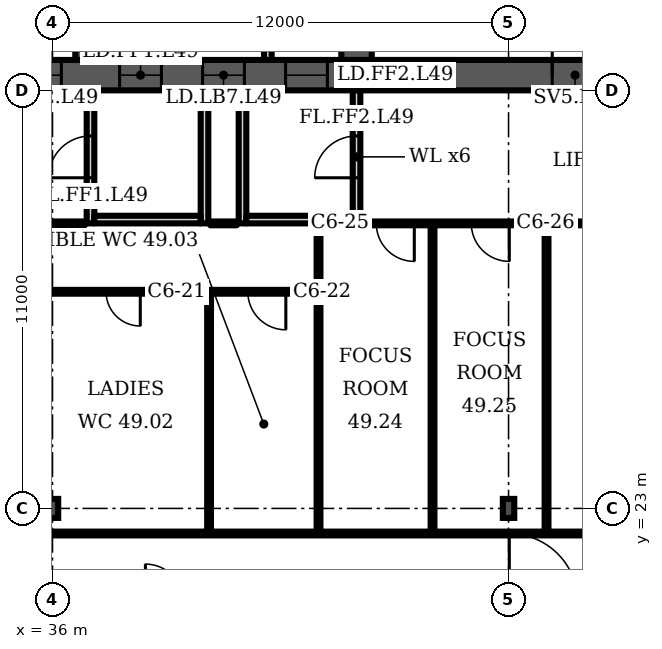
"""IFC4 building model, lengths in metres.
Left out: names, types, materials, properties, quantities, classifications, styles, units other than length and angle.
Written with IfcOpenShell. Run it as: python <this file> out.ifc"""

import sys

from ifc_helpers import new_model, si_unit, direction, frame, frame_2d, origin, origin_2d, place, context, subcontext, project, spatial, polyline, rectangle, i_section, outline, extrude, element, fill, save


model = new_model("IFC4")
c1 = context("Model", 3, precision=1e-05, world=origin(), true_north=direction((0.0, 1.0)))
c2 = subcontext(c1, "Body", "Model", "MODEL_VIEW")
j1 = project(units=[si_unit("LENGTHUNIT", "METRE"), si_unit("PLANEANGLEUNIT", "RADIAN")], contexts=[c1])
p1 = place(None, origin())
s1 = spatial("IfcSite", under=j1, at=p1, CompositionType="ELEMENT")
p2 = place(p1, origin())
s2 = spatial("IfcBuilding", under=s1, at=p2, CompositionType="ELEMENT")
p3 = place(p2, frame((0.0, 0.0, 198.7)))
s3 = spatial("IfcBuildingStorey", under=s2, at=p3, CompositionType="ELEMENT", Elevation=198.7)
p4 = place(p3, frame((16.0, 34.4, 0.0), z_axis=(0.0, 0.0, 1.0), x_axis=(1.0, 0.0, 0.0)))
e1 = element("IfcWall", 1, at=p4, inside=s3, PredefinedType="SHEAR", context=c2, shape_type="SweptSolid", body=[
    extrude(rectangle(XDim=42.0, YDim=0.8, at=frame_2d((21.0, 0.0))), origin(), (0.0, 0.0, 1.0), 3.6),
])
p5 = place(p4, frame((1.75, 0.0, 0.0)))
e2 = element("IfcOpeningElement", 2, at=p5, cuts=e1, PredefinedType="OPENING", context=c2, shape_type="SweptSolid", body=[
    extrude(rectangle(XDim=1.0, YDim=2.1, at=frame_2d((0.5, 1.05))), frame((0.0, 0.41, 0.0), z_axis=(0.0, -1.0, 0.0), x_axis=(1.0, 0.0, 0.0)), (0.0, 0.0, 1.0), 0.82),
])
p6 = place(p4, frame((4.65, 0.0, 0.0)))
e3 = element("IfcOpeningElement", 3, at=p6, cuts=e1, PredefinedType="OPENING", context=c2, shape_type="SweptSolid", body=[
    extrude(rectangle(XDim=1.0, YDim=2.1, at=frame_2d((0.5, 1.05))), frame((0.0, 0.41, 0.0), z_axis=(0.0, -1.0, 0.0), x_axis=(1.0, 0.0, 0.0)), (0.0, 0.0, 1.0), 0.82),
])
p7 = place(p4, frame((7.65, 0.0, 0.0)))
e4 = element("IfcOpeningElement", 4, at=p7, cuts=e1, PredefinedType="OPENING", context=c2, shape_type="SweptSolid", body=[
    extrude(rectangle(XDim=1.2, YDim=2.1, at=frame_2d((0.6, 1.05))), frame((0.0, 0.41, 0.0), z_axis=(0.0, -1.0, 0.0), x_axis=(1.0, 0.0, 0.0)), (0.0, 0.0, 1.0), 0.82),
])
p8 = place(p4, frame((14.767, 0.0, 0.0)))
e5 = element("IfcOpeningElement", 5, at=p8, cuts=e1, PredefinedType="OPENING", context=c2, shape_type="SweptSolid", body=[
    extrude(rectangle(XDim=1.1, YDim=2.1, at=frame_2d((0.55, 1.05))), frame((0.0, 0.41, 0.0), z_axis=(0.0, -1.0, 0.0), x_axis=(1.0, 0.0, 0.0)), (0.0, 0.0, 1.0), 0.82),
])
p9 = place(p4, frame((19.133, 0.0, 0.0)))
e6 = element("IfcOpeningElement", 6, at=p9, cuts=e1, PredefinedType="OPENING", context=c2, shape_type="SweptSolid", body=[
    extrude(rectangle(XDim=1.1, YDim=2.1, at=frame_2d((0.55, 1.05))), frame((0.0, 0.41, 0.0), z_axis=(0.0, -1.0, 0.0), x_axis=(1.0, 0.0, 0.0)), (0.0, 0.0, 1.0), 0.82),
])
p10 = place(p4, frame((16.8, 0.0, 0.0)))
e7 = element("IfcOpeningElement", 7, at=p10, cuts=e1, PredefinedType="OPENING", context=c2, shape_type="SweptSolid", body=[
    extrude(rectangle(XDim=1.4, YDim=2.1, at=frame_2d((0.7, 1.05))), frame((0.0, 0.41, 0.0), z_axis=(0.0, -1.0, 0.0), x_axis=(1.0, 0.0, 0.0)), (0.0, 0.0, 1.0), 0.82),
])
p11 = place(p4, frame((21.767, 0.0, 0.0)))
e8 = element("IfcOpeningElement", 8, at=p11, cuts=e1, PredefinedType="OPENING", context=c2, shape_type="SweptSolid", body=[
    extrude(rectangle(XDim=1.1, YDim=2.1, at=frame_2d((0.55, 1.05))), frame((0.0, 0.41, 0.0), z_axis=(0.0, -1.0, 0.0), x_axis=(1.0, 0.0, 0.0)), (0.0, 0.0, 1.0), 0.82),
])
p12 = place(p4, frame((23.95, 0.0, 0.0)))
e9 = element("IfcOpeningElement", 9, at=p12, cuts=e1, PredefinedType="OPENING", context=c2, shape_type="SweptSolid", body=[
    extrude(rectangle(XDim=1.1, YDim=2.1, at=frame_2d((0.55, 1.05))), frame((0.0, 0.41, 0.0), z_axis=(0.0, -1.0, 0.0), x_axis=(1.0, 0.0, 0.0)), (0.0, 0.0, 1.0), 0.82),
])
p13 = place(p4, frame((26.133, 0.0, 0.0)))
e10 = element("IfcOpeningElement", 10, at=p13, cuts=e1, PredefinedType="OPENING", context=c2, shape_type="SweptSolid", body=[
    extrude(rectangle(XDim=1.1, YDim=2.1, at=frame_2d((0.55, 1.05))), frame((0.0, 0.41, 0.0), z_axis=(0.0, -1.0, 0.0), x_axis=(1.0, 0.0, 0.0)), (0.0, 0.0, 1.0), 0.82),
])
p14 = place(p4, frame((33.15, 0.0, 0.0)))
e11 = element("IfcOpeningElement", 11, at=p14, cuts=e1, PredefinedType="OPENING", context=c2, shape_type="SweptSolid", body=[
    extrude(rectangle(XDim=1.2, YDim=2.1, at=frame_2d((0.6, 1.05))), frame((0.0, 0.41, 0.0), z_axis=(0.0, -1.0, 0.0), x_axis=(1.0, 0.0, 0.0)), (0.0, 0.0, 1.0), 0.82),
])
p15 = place(p4, frame((35.817, 0.0, 0.0)))
e12 = element("IfcOpeningElement", 12, at=p15, cuts=e1, PredefinedType="OPENING", context=c2, shape_type="SweptSolid", body=[
    extrude(rectangle(XDim=1.0, YDim=2.1, at=frame_2d((0.5, 1.05))), frame((0.0, 0.41, 0.0), z_axis=(0.0, -1.0, 0.0), x_axis=(1.0, 0.0, 0.0)), (0.0, 0.0, 1.0), 0.82),
])
p16 = place(p4, frame((39.95, 0.0, 0.0)))
e13 = element("IfcOpeningElement", 13, at=p16, cuts=e1, PredefinedType="OPENING", context=c2, shape_type="SweptSolid", body=[
    extrude(rectangle(XDim=1.0, YDim=2.1, at=frame_2d((0.5, 1.05))), frame((0.0, 0.41, 0.0), z_axis=(0.0, -1.0, 0.0), x_axis=(1.0, 0.0, 0.0)), (0.0, 0.0, 1.0), 0.82),
])
p17 = place(p4, frame((37.767, 0.0, 0.0)))
e14 = element("IfcOpeningElement", 14, at=p17, cuts=e1, PredefinedType="OPENING", context=c2, shape_type="SweptSolid", body=[
    extrude(rectangle(XDim=1.4, YDim=2.1, at=frame_2d((0.7, 1.05))), frame((0.0, 0.41, 0.0), z_axis=(0.0, -1.0, 0.0), x_axis=(1.0, 0.0, 0.0)), (0.0, 0.0, 1.0), 0.82),
])
p18 = place(p3, frame((37.0, 34.8, 0.0), z_axis=(0.0, 0.0, 1.0), x_axis=(0.0, 1.0, 0.0)))
e15 = element("IfcWall", 15, at=p18, inside=s3, PredefinedType="SHEAR", context=c2, shape_type="SweptSolid", body=[
    extrude(rectangle(XDim=14.987, YDim=0.8, at=frame_2d((7.493, 0.0))), origin(), (0.0, 0.0, 1.0), 3.6),
])
p19 = place(p18, frame((11.312, 0.0, 0.0)))
e16 = element("IfcOpeningElement", 16, at=p19, cuts=e15, PredefinedType="OPENING", context=c2, shape_type="SweptSolid", body=[
    extrude(rectangle(XDim=1.0, YDim=2.1, at=frame_2d((0.5, 1.05))), frame((0.0, 0.41, 0.0), z_axis=(0.0, -1.0, 0.0), x_axis=(1.0, 0.0, 0.0)), (0.0, 0.0, 1.0), 0.82),
])
p20 = place(p18, frame((3.6, 0.0, 0.0)))
e17 = element("IfcOpeningElement", 17, at=p20, cuts=e15, PredefinedType="OPENING", context=c2, shape_type="SweptSolid", body=[
    extrude(rectangle(XDim=1.1, YDim=2.1, at=frame_2d((0.55, 1.05))), frame((0.0, 0.41, 0.0), z_axis=(0.0, -1.0, 0.0), x_axis=(1.0, 0.0, 0.0)), (0.0, 0.0, 1.0), 0.82),
])
p21 = place(p3, frame((44.0, 34.8, 0.0), z_axis=(0.0, 0.0, 1.0), x_axis=(0.0, 1.0, 0.0)))
e18 = element("IfcWall", 18, at=p21, inside=s3, PredefinedType="SHEAR", context=c2, shape_type="SweptSolid", body=[
    extrude(rectangle(XDim=14.374, YDim=0.8, at=frame_2d((7.187, 0.0))), origin(), (0.0, 0.0, 1.0), 3.6),
])
p22 = place(p21, frame((11.312, 0.0, 0.0)))
e19 = element("IfcOpeningElement", 19, at=p22, cuts=e18, PredefinedType="OPENING", context=c2, shape_type="SweptSolid", body=[
    extrude(rectangle(XDim=1.0, YDim=2.1, at=frame_2d((0.5, 1.05))), frame((0.0, 0.41, 0.0), z_axis=(0.0, -1.0, 0.0), x_axis=(1.0, 0.0, 0.0)), (0.0, 0.0, 1.0), 0.82),
])
p23 = place(p21, frame((3.6, 0.0, 0.0)))
e20 = element("IfcOpeningElement", 20, at=p23, cuts=e18, PredefinedType="OPENING", context=c2, shape_type="SweptSolid", body=[
    extrude(rectangle(XDim=1.1, YDim=2.1, at=frame_2d((0.55, 1.05))), frame((0.0, 0.41, 0.0), z_axis=(0.0, -1.0, 0.0), x_axis=(1.0, 0.0, 0.0)), (0.0, 0.0, 1.0), 0.82),
])
for number, where, z_axis, x_axis in (
    (21, (36.0, 23.0, 0.0), (0.0, 0.0, 1.0), (1.0, 0.0, 0.0)),
    (22, (48.0, 23.0, 0.0), (0.0, 0.0, 1.0), (1.0, 0.0, 0.0)),
):
    element("IfcColumn", number, at=place(p3, frame(where, z_axis=z_axis, x_axis=x_axis)), inside=s3, PredefinedType="COLUMN", context=c2, shape_type="SweptSolid", body=[
        extrude(i_section(OverallWidth=0.3, OverallDepth=0.5, WebThickness=0.014, FlangeThickness=0.028, FilletRadius=0.027, at=origin_2d()), origin(), (0.0, 0.0, 1.0), 3.6),
    ])
p24 = place(p3, origin())
e23 = element("IfcWall", 23, at=p24, inside=s3, PredefinedType="PARTITIONING", context=c2, shape_type="SweptSolid", body=[
    extrude(outline(polyline([(34.567, 37.85), (34.767, 37.85), (36.6, 37.85), (36.6, 37.65), (34.767, 37.65), (34.767, 34.8), (34.567, 34.8), (34.567, 37.85)])), origin(), (0.0, 0.0, 1.0), 3.15),
])
p25 = place(p3, origin())
e24 = element("IfcWall", 24, at=p25, inside=s3, PredefinedType="PARTITIONING", context=c2, shape_type="SweptSolid", body=[
    extrude(outline(polyline([(41.567, 37.1), (39.433, 37.1), (39.433, 34.8), (39.233, 34.8), (39.233, 37.65), (37.4, 37.65), (37.4, 37.85), (39.233, 37.85), (39.433, 37.85), (39.433, 37.3), (41.567, 37.3), (41.567, 37.55), (41.767, 37.55), (43.6, 37.55), (43.6, 37.35), (41.767, 37.35), (41.767, 34.8), (41.567, 34.8), (41.567, 37.1)])), origin(), (0.0, 0.0, 1.0), 3.15),
])
p26 = place(p3, frame((37.0, 30.5, 0.0), z_axis=(0.0, 0.0, 1.0), x_axis=(0.0, 1.0, 0.0)))
e25 = element("IfcWall", 25, at=p26, inside=s3, PredefinedType="PARTITIONING", context=c2, shape_type="SweptSolid", body=[
    extrude(rectangle(XDim=3.5, YDim=0.2, at=frame_2d((1.75, 0.0))), origin(), (0.0, 0.0, 1.0), 3.15),
])
p27 = place(p26, frame((1.2, 0.0, 0.0)))
e26 = element("IfcOpeningElement", 26, at=p27, cuts=e25, PredefinedType="OPENING", context=c2, shape_type="SweptSolid", body=[
    extrude(rectangle(XDim=1.1, YDim=2.1, at=frame_2d((0.55, 1.05))), frame((0.0, 0.11, 0.0), z_axis=(0.0, -1.0, 0.0), x_axis=(1.0, 0.0, 0.0)), (0.0, 0.0, 1.0), 0.22),
])
p28 = place(p3, frame((40.0, 30.5, 0.0), z_axis=(0.0, 0.0, 1.0), x_axis=(0.0, 1.0, 0.0)))
e27 = element("IfcWall", 27, at=p28, inside=s3, PredefinedType="PARTITIONING", context=c2, shape_type="SweptSolid", body=[
    extrude(rectangle(XDim=3.5, YDim=0.2, at=frame_2d((1.75, 0.0))), origin(), (0.0, 0.0, 1.0), 3.15),
])
p29 = place(p3, frame((37.1, 30.6, 0.0), z_axis=(0.0, 0.0, 1.0), x_axis=(1.0, 0.0, 0.0)))
e28 = element("IfcWall", 28, at=p29, inside=s3, PredefinedType="PARTITIONING", context=c2, shape_type="SweptSolid", body=[
    extrude(rectangle(XDim=2.8, YDim=0.2, at=frame_2d((1.4, 0.0))), origin(), (0.0, 0.0, 1.0), 3.15),
])
p30 = place(p3, frame((41.0, 30.5, 0.0), z_axis=(0.0, 0.0, 1.0), x_axis=(0.0, 1.0, 0.0)))
e29 = element("IfcWall", 29, at=p30, inside=s3, PredefinedType="PARTITIONING", context=c2, shape_type="SweptSolid", body=[
    extrude(rectangle(XDim=3.5, YDim=0.2, at=frame_2d((1.75, 0.0))), origin(), (0.0, 0.0, 1.0), 3.15),
])
p31 = place(p3, frame((44.0, 30.5, 0.0), z_axis=(0.0, 0.0, 1.0), x_axis=(0.0, 1.0, 0.0)))
e30 = element("IfcWall", 30, at=p31, inside=s3, PredefinedType="PARTITIONING", context=c2, shape_type="SweptSolid", body=[
    extrude(rectangle(XDim=3.5, YDim=0.2, at=frame_2d((1.75, 0.0))), origin(), (0.0, 0.0, 1.0), 3.15),
])
p32 = place(p31, frame((1.2, 0.0, 0.0)))
e31 = element("IfcOpeningElement", 31, at=p32, cuts=e30, PredefinedType="OPENING", context=c2, shape_type="SweptSolid", body=[
    extrude(rectangle(XDim=1.1, YDim=2.1, at=frame_2d((0.55, 1.05))), frame((0.0, 0.11, 0.0), z_axis=(0.0, -1.0, 0.0), x_axis=(1.0, 0.0, 0.0)), (0.0, 0.0, 1.0), 0.22),
])
p33 = place(p3, frame((41.1, 30.6, 0.0), z_axis=(0.0, 0.0, 1.0), x_axis=(1.0, 0.0, 0.0)))
e32 = element("IfcWall", 32, at=p33, inside=s3, PredefinedType="PARTITIONING", context=c2, shape_type="SweptSolid", body=[
    extrude(rectangle(XDim=2.8, YDim=0.2, at=frame_2d((1.4, 0.0))), origin(), (0.0, 0.0, 1.0), 3.15),
])
p34 = place(p3, frame((18.2, 30.5, 0.0), z_axis=(0.0, 0.0, 1.0), x_axis=(1.0, 0.0, 0.0)))
e33 = element("IfcWall", 33, at=p34, inside=s3, PredefinedType="PARTITIONING", context=c2, shape_type="SweptSolid", body=[
    extrude(rectangle(XDim=18.65, YDim=0.1, at=frame_2d((9.325, 0.0))), origin(), (0.0, 0.0, 1.0), 3.15),
])
p35 = place(p34, frame((0.74, 0.0, 0.0)))
e34 = element("IfcOpeningElement", 34, at=p35, cuts=e33, PredefinedType="OPENING", context=c2, shape_type="SweptSolid", body=[
    extrude(rectangle(XDim=1.0, YDim=2.1, at=frame_2d((0.5, 1.05))), frame((0.0, 0.06, 0.0), z_axis=(0.0, -1.0, 0.0), x_axis=(1.0, 0.0, 0.0)), (0.0, 0.0, 1.0), 0.12),
])
p36 = place(p3, frame((18.955, 22.34, 0.0), z_axis=(0.0, 0.0, 1.0), x_axis=(1.0, 0.0, 0.0)))
e35 = element("IfcWall", 35, at=p36, inside=s3, PredefinedType="PARTITIONING", context=c2, shape_type="SweptSolid", body=[
    extrude(rectangle(XDim=42.555, YDim=0.1, at=frame_2d((21.277, 0.0))), origin(), (0.0, 0.0, 1.0), 3.15),
])
p37 = place(p36, frame((0.62, 0.0, 0.0)))
e36 = element("IfcOpeningElement", 36, at=p37, cuts=e35, PredefinedType="OPENING", context=c2, shape_type="SweptSolid", body=[
    extrude(rectangle(XDim=1.0, YDim=2.1, at=frame_2d((0.5, 1.05))), frame((0.0, 0.06, 0.0), z_axis=(0.0, -1.0, 0.0), x_axis=(1.0, 0.0, 0.0)), (0.0, 0.0, 1.0), 0.12),
])
p38 = place(p36, frame((8.62, 0.0, 0.0)))
e37 = element("IfcOpeningElement", 37, at=p38, cuts=e35, PredefinedType="OPENING", context=c2, shape_type="SweptSolid", body=[
    extrude(rectangle(XDim=1.0, YDim=2.1, at=frame_2d((0.5, 1.05))), frame((0.0, 0.06, 0.0), z_axis=(0.0, -1.0, 0.0), x_axis=(1.0, 0.0, 0.0)), (0.0, 0.0, 1.0), 0.12),
])
p39 = place(p3, frame((31.0, 28.7, 0.0), z_axis=(0.0, 0.0, 1.0), x_axis=(1.0, 0.0, 0.0)))
e38 = element("IfcWall", 38, at=p39, inside=s3, PredefinedType="PARTITIONING", context=c2, shape_type="SweptSolid", body=[
    extrude(rectangle(XDim=12.0, YDim=0.1, at=frame_2d((6.0, 0.0))), origin(), (0.0, 0.0, 1.0), 3.15),
])
p40 = place(p39, frame((1.87, 0.0, 0.0)))
e39 = element("IfcOpeningElement", 39, at=p40, cuts=e38, PredefinedType="OPENING", context=c2, shape_type="SweptSolid", body=[
    extrude(rectangle(XDim=0.9, YDim=2.1, at=frame_2d((0.45, 1.05))), frame((0.0, 0.06, 0.0), z_axis=(0.0, -1.0, 0.0), x_axis=(1.0, 0.0, 0.0)), (0.0, 0.0, 1.0), 0.12),
])
p41 = place(p39, frame((6.41, 0.0, 0.0)))
e40 = element("IfcOpeningElement", 40, at=p41, cuts=e38, PredefinedType="OPENING", context=c2, shape_type="SweptSolid", body=[
    extrude(rectangle(XDim=0.9, YDim=2.1, at=frame_2d((0.45, 1.05))), frame((0.0, 0.06, 0.0), z_axis=(0.0, -1.0, 0.0), x_axis=(1.0, 0.0, 0.0)), (0.0, 0.0, 1.0), 0.12),
])
p42 = place(p39, frame((10.14, 0.0, 0.0)))
e41 = element("IfcOpeningElement", 41, at=p42, cuts=e38, PredefinedType="OPENING", context=c2, shape_type="SweptSolid", body=[
    extrude(rectangle(XDim=1.0, YDim=2.1, at=frame_2d((0.5, 1.05))), frame((0.0, 0.06, 0.0), z_axis=(0.0, -1.0, 0.0), x_axis=(1.0, 0.0, 0.0)), (0.0, 0.0, 1.0), 0.12),
])
p43 = place(p3, frame((40.12, 22.34, 0.0), z_axis=(0.0, 0.0, 1.0), x_axis=(0.0, 1.0, 0.0)))
e42 = element("IfcWall", 42, at=p43, inside=s3, PredefinedType="PARTITIONING", context=c2, shape_type="SweptSolid", body=[
    extrude(rectangle(XDim=6.36, YDim=0.1, at=frame_2d((3.18, 0.0))), origin(), (0.0, 0.0, 1.0), 3.15),
])
p44 = place(p3, frame((43.0, 22.34, 0.0), z_axis=(0.0, 0.0, 1.0), x_axis=(0.0, 1.0, 0.0)))
e43 = element("IfcWall", 43, at=p44, inside=s3, PredefinedType="PARTITIONING", context=c2, shape_type="SweptSolid", body=[
    extrude(rectangle(XDim=8.15, YDim=0.1, at=frame_2d((4.075, 0.0))), origin(), (0.0, 0.0, 1.0), 3.15),
])
for number, where, z_axis, x_axis in (
    (44, (46.0, 22.34, 0.0), (0.0, 0.0, 1.0), (0.0, 1.0, 0.0)),
    (45, (49.0, 22.34, 0.0), (0.0, 0.0, 1.0), (0.0, 1.0, 0.0)),
):
    element("IfcWall", number, at=place(p3, frame(where, z_axis=z_axis, x_axis=x_axis)), inside=s3, PredefinedType="PARTITIONING", context=c2, shape_type="SweptSolid", body=[
        extrude(rectangle(XDim=8.16, YDim=0.1, at=frame_2d((4.08, 0.0))), origin(), (0.0, 0.0, 1.0), 3.15),
    ])
p45 = place(p3, frame((40.15, 30.5, 0.0), z_axis=(0.0, 0.0, 1.0), x_axis=(1.0, 0.0, 0.0)))
e46 = element("IfcWall", 46, at=p45, inside=s3, PredefinedType="PARTITIONING", context=c2, shape_type="SweptSolid", body=[
    extrude(rectangle(XDim=0.7, YDim=0.1, at=frame_2d((0.35, 0.0))), origin(), (0.0, 0.0, 1.0), 3.15),
])
p46 = place(p3, frame((44.15, 30.5, 0.0), z_axis=(0.0, 0.0, 1.0), x_axis=(1.0, 0.0, 0.0)))
e47 = element("IfcWall", 47, at=p46, inside=s3, PredefinedType="PARTITIONING", context=c2, shape_type="SweptSolid", body=[
    extrude(rectangle(XDim=13.85, YDim=0.1, at=frame_2d((6.925, 0.0))), origin(), (0.0, 0.0, 1.0), 3.15),
])
p47 = place(p46, frame((0.37, 0.0, 0.0)))
e48 = element("IfcOpeningElement", 48, at=p47, cuts=e47, PredefinedType="OPENING", context=c2, shape_type="SweptSolid", body=[
    extrude(rectangle(XDim=1.0, YDim=2.1, at=frame_2d((0.5, 1.05))), frame((0.0, 0.06, 0.0), z_axis=(0.0, -1.0, 0.0), x_axis=(1.0, 0.0, 0.0)), (0.0, 0.0, 1.0), 0.12),
])
p48 = place(p46, frame((2.87, 0.0, 0.0)))
e49 = element("IfcOpeningElement", 49, at=p48, cuts=e47, PredefinedType="OPENING", context=c2, shape_type="SweptSolid", body=[
    extrude(rectangle(XDim=1.0, YDim=2.1, at=frame_2d((0.5, 1.05))), frame((0.0, 0.06, 0.0), z_axis=(0.0, -1.0, 0.0), x_axis=(1.0, 0.0, 0.0)), (0.0, 0.0, 1.0), 0.12),
])
p49 = place(p46, frame((10.67, 0.0, 0.0)))
e50 = element("IfcOpeningElement", 50, at=p49, cuts=e47, PredefinedType="OPENING", context=c2, shape_type="SweptSolid", body=[
    extrude(rectangle(XDim=1.0, YDim=2.1, at=frame_2d((0.5, 1.05))), frame((0.0, 0.06, 0.0), z_axis=(0.0, -1.0, 0.0), x_axis=(1.0, 0.0, 0.0)), (0.0, 0.0, 1.0), 0.12),
])
p50 = place(p9, origin())
e51 = element("IfcDoor", 51, at=p50, inside=s3, OperationType="DOUBLE_DOOR_SLIDING", PredefinedType="DOOR", context=c2, shape_type="SweptSolid", body=[
    extrude(rectangle(XDim=1.1, YDim=2.1, at=frame_2d((0.55, 1.05))), frame((0.0, 0.025, 0.0), z_axis=(0.0, -1.0, 0.0), x_axis=(1.0, 0.0, 0.0)), (0.0, 0.0, 1.0), 0.05),
])
fill(e6, e51)
p51 = place(p11, origin())
e52 = element("IfcDoor", 52, at=p51, inside=s3, OperationType="DOUBLE_DOOR_SLIDING", PredefinedType="DOOR", context=c2, shape_type="SweptSolid", body=[
    extrude(rectangle(XDim=1.1, YDim=2.1, at=frame_2d((0.55, 1.05))), frame((0.0, 0.025, 0.0), z_axis=(0.0, -1.0, 0.0), x_axis=(1.0, 0.0, 0.0)), (0.0, 0.0, 1.0), 0.05),
])
fill(e8, e52)
p52 = place(p12, origin())
e53 = element("IfcDoor", 53, at=p52, inside=s3, OperationType="DOUBLE_DOOR_SLIDING", PredefinedType="DOOR", context=c2, shape_type="SweptSolid", body=[
    extrude(rectangle(XDim=1.1, YDim=2.1, at=frame_2d((0.55, 1.05))), frame((0.0, 0.025, 0.0), z_axis=(0.0, -1.0, 0.0), x_axis=(1.0, 0.0, 0.0)), (0.0, 0.0, 1.0), 0.05),
])
fill(e9, e53)
p53 = place(p13, origin())
e54 = element("IfcDoor", 54, at=p53, inside=s3, OperationType="DOUBLE_DOOR_SLIDING", PredefinedType="DOOR", context=c2, shape_type="SweptSolid", body=[
    extrude(rectangle(XDim=1.1, YDim=2.1, at=frame_2d((0.55, 1.05))), frame((0.0, 0.025, 0.0), z_axis=(0.0, -1.0, 0.0), x_axis=(1.0, 0.0, 0.0)), (0.0, 0.0, 1.0), 0.05),
])
fill(e10, e54)
p54 = place(p14, origin())
e55 = element("IfcDoor", 55, at=p54, inside=s3, OperationType="SINGLE_SWING_LEFT", PredefinedType="DOOR", context=c2, shape_type="SweptSolid", body=[
    extrude(rectangle(XDim=1.2, YDim=2.1, at=frame_2d((0.6, 1.05))), frame((0.0, 0.025, 0.0), z_axis=(0.0, -1.0, 0.0), x_axis=(1.0, 0.0, 0.0)), (0.0, 0.0, 1.0), 0.05),
])
fill(e11, e55)
p55 = place(p27, origin())
e56 = element("IfcDoor", 56, at=p55, inside=s3, OperationType="SINGLE_SWING_LEFT", PredefinedType="DOOR", context=c2, shape_type="SweptSolid", body=[
    extrude(rectangle(XDim=1.1, YDim=2.1, at=frame_2d((0.55, 1.05))), frame((0.0, 0.025, 0.0), z_axis=(0.0, -1.0, 0.0), x_axis=(1.0, 0.0, 0.0)), (0.0, 0.0, 1.0), 0.05),
])
fill(e26, e56)
p56 = place(p32, origin())
e57 = element("IfcDoor", 57, at=p56, inside=s3, OperationType="SINGLE_SWING_LEFT", PredefinedType="DOOR", context=c2, shape_type="SweptSolid", body=[
    extrude(rectangle(XDim=1.1, YDim=2.1, at=frame_2d((0.55, 1.05))), frame((0.0, 0.025, 0.0), z_axis=(0.0, -1.0, 0.0), x_axis=(1.0, 0.0, 0.0)), (0.0, 0.0, 1.0), 0.05),
])
fill(e31, e57)
p57 = place(p41, origin())
e58 = element("IfcDoor", 58, at=p57, inside=s3, OperationType="SINGLE_SWING_RIGHT", PredefinedType="DOOR", context=c2, shape_type="SweptSolid", body=[
    extrude(rectangle(XDim=0.9, YDim=2.1, at=frame_2d((0.45, 1.05))), frame((0.0, 0.025, 0.0), z_axis=(0.0, -1.0, 0.0), x_axis=(1.0, 0.0, 0.0)), (0.0, 0.0, 1.0), 0.05),
])
fill(e40, e58)
p58 = place(p42, origin())
e59 = element("IfcDoor", 59, at=p58, inside=s3, OperationType="SINGLE_SWING_RIGHT", PredefinedType="DOOR", context=c2, shape_type="SweptSolid", body=[
    extrude(rectangle(XDim=1.0, YDim=2.1, at=frame_2d((0.5, 1.05))), frame((0.0, 0.025, 0.0), z_axis=(0.0, -1.0, 0.0), x_axis=(1.0, 0.0, 0.0)), (0.0, 0.0, 1.0), 0.05),
])
fill(e41, e59)
p59 = place(p47, origin())
e60 = element("IfcDoor", 60, at=p59, inside=s3, OperationType="SINGLE_SWING_RIGHT", PredefinedType="DOOR", context=c2, shape_type="SweptSolid", body=[
    extrude(rectangle(XDim=1.0, YDim=2.1, at=frame_2d((0.5, 1.05))), frame((0.0, 0.025, 0.0), z_axis=(0.0, -1.0, 0.0), x_axis=(1.0, 0.0, 0.0)), (0.0, 0.0, 1.0), 0.05),
])
fill(e48, e60)
p60 = place(p48, origin())
e61 = element("IfcDoor", 61, at=p60, inside=s3, OperationType="SINGLE_SWING_RIGHT", PredefinedType="DOOR", context=c2, shape_type="SweptSolid", body=[
    extrude(rectangle(XDim=1.0, YDim=2.1, at=frame_2d((0.5, 1.05))), frame((0.0, 0.025, 0.0), z_axis=(0.0, -1.0, 0.0), x_axis=(1.0, 0.0, 0.0)), (0.0, 0.0, 1.0), 0.05),
])
fill(e49, e61)
save(model, sys.argv[1])
